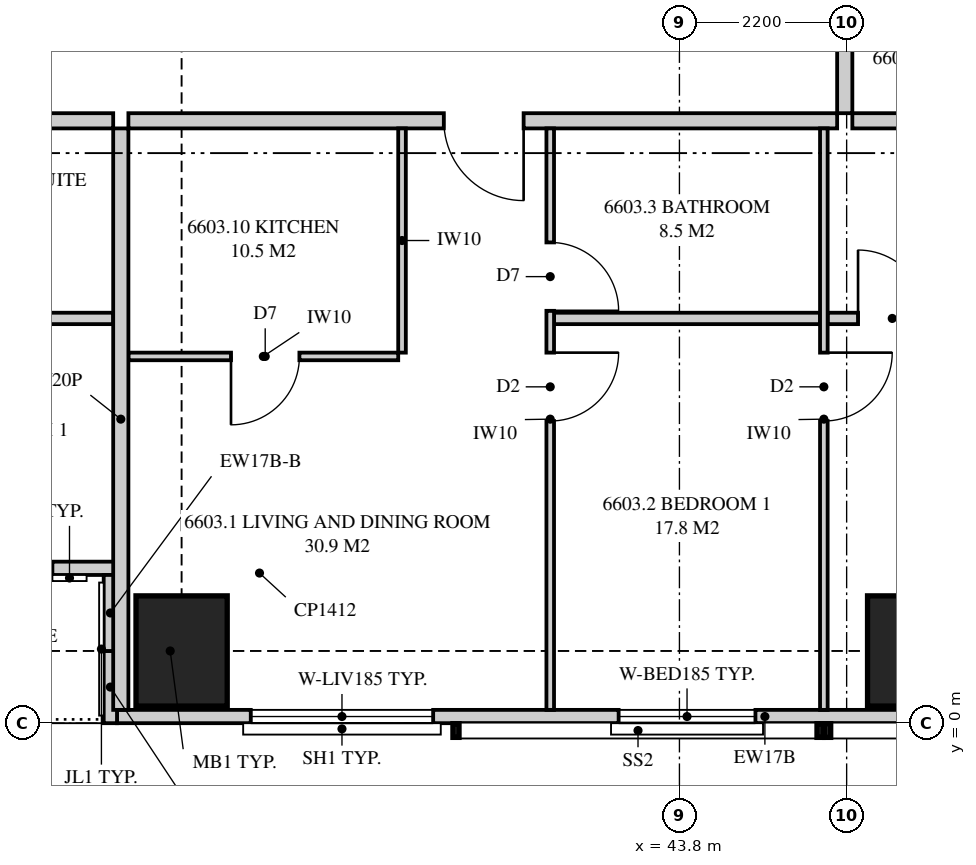
"""IFC4 building model, lengths in metres.
Left out: names, types, materials, properties, quantities, classifications, styles, units other than length and angle.
Written with IfcOpenShell. Run it as: python <this file> out.ifc"""

import sys

from ifc_helpers import new_model, si_unit, direction, frame, frame_2d, origin, origin_2d, place, context, subcontext, project, spatial, polyline, rectangle, outline, extrude, element, fill, save


model = new_model("IFC4")
c1 = context("Model", 3, precision=1e-05, world=origin(), true_north=direction((0.0, 1.0)))
c2 = subcontext(c1, "Body", "Model", "MODEL_VIEW")
j1 = project(units=[si_unit("LENGTHUNIT", "METRE"), si_unit("PLANEANGLEUNIT", "RADIAN")], contexts=[c1])
p1 = place(None, origin())
s1 = spatial("IfcSite", under=j1, at=p1, CompositionType="ELEMENT")
p2 = place(p1, origin())
s2 = spatial("IfcBuilding", under=s1, at=p2, CompositionType="ELEMENT")
p3 = place(p2, frame((0.0, 0.0, 242.45)))
s3 = spatial("IfcBuildingStorey", under=s2, at=p3, CompositionType="ELEMENT", Elevation=242.45)
for number, where, z_axis, x_axis in (
    (1, (37.25, 0.95, 0.0), (0.0, 0.0, 1.0), (0.0, 1.0, 0.0)),
    (2, (46.875, 0.95, 0.0), (0.0, 0.0, 1.0), (0.0, 1.0, 0.0)),
):
    element("IfcColumn", number, at=place(p3, frame(where, z_axis=z_axis, x_axis=x_axis)), inside=s3, PredefinedType="COLUMN", context=c2, shape_type="SweptSolid", body=[
        extrude(rectangle(XDim=1.45, YDim=1.2, at=origin_2d()), origin(), (0.0, 0.0, 1.0), 3.5),
    ])
p4 = place(p3, frame((36.4, 0.087, 0.0), z_axis=(0.0, 0.0, 1.0), x_axis=(1.0, 0.0, 0.0)))
e3 = element("IfcWall", 3, at=p4, inside=s3, PredefinedType="SOLIDWALL", context=c2, shape_type="SweptSolid", body=[
    extrude(outline(polyline([(0.0, 0.0), (17.049, 0.0), (17.049, 3.26), (10.69, 3.26), (10.69, 2.3), (10.606, 2.3), (10.606, 3.26), (10.475, 3.26), (10.475, 2.3), (0.0, 2.3), (0.0, 0.0)])), frame((0.0, 0.087, 0.0), z_axis=(0.0, -1.0, 0.0), x_axis=(1.0, 0.0, 0.0)), (0.0, 0.0, 1.0), 0.175),
])
p5 = place(p4, frame((1.76, 0.0, 0.4)))
e4 = element("IfcOpeningElement", 4, at=p5, cuts=e3, PredefinedType="OPENING", context=c2, shape_type="SweptSolid", body=[
    extrude(rectangle(XDim=2.4, YDim=1.85, at=frame_2d((1.2, 0.925))), frame((0.0, 0.097, 0.0), z_axis=(0.0, -1.0, 0.0), x_axis=(1.0, 0.0, 0.0)), (0.0, 0.0, 1.0), 0.195),
])
p6 = place(p4, frame((6.6, 0.0, 0.4)))
e5 = element("IfcOpeningElement", 5, at=p6, cuts=e3, PredefinedType="OPENING", context=c2, shape_type="SweptSolid", body=[
    extrude(rectangle(XDim=1.8, YDim=1.85, at=frame_2d((0.9, 0.925))), frame((0.0, 0.097, 0.0), z_axis=(0.0, -1.0, 0.0), x_axis=(1.0, 0.0, 0.0)), (0.0, 0.0, 1.0), 0.195),
])
p7 = place(p4, frame((11.357, 0.0, 0.4)))
e6 = element("IfcOpeningElement", 6, at=p7, cuts=e3, PredefinedType="OPENING", context=c2, shape_type="SweptSolid", body=[
    extrude(rectangle(XDim=1.8, YDim=1.85, at=frame_2d((0.9, 0.925))), frame((0.0, 0.097, 0.0), z_axis=(0.0, -1.0, 0.0), x_axis=(1.0, 0.0, 0.0)), (0.0, 0.0, 1.0), 0.195),
])
p8 = place(p4, frame((14.2, 0.0, 0.4)))
e7 = element("IfcOpeningElement", 7, at=p8, cuts=e3, PredefinedType="OPENING", context=c2, shape_type="SweptSolid", body=[
    extrude(rectangle(XDim=1.8, YDim=1.85, at=frame_2d((0.9, 0.925))), frame((0.0, 0.097, 0.0), z_axis=(0.0, -1.0, 0.0), x_axis=(1.0, 0.0, 0.0)), (0.0, 0.0, 1.0), 0.195),
])
p9 = place(p3, frame((32.9, 2.038, 0.0), z_axis=(0.0, 0.0, 1.0), x_axis=(1.0, 0.0, 0.0)))
e8 = element("IfcWall", 8, at=p9, inside=s3, PredefinedType="SOLIDWALL", context=c2, shape_type="SweptSolid", body=[
    extrude(outline(polyline([(0.0, 0.0), (3.5, 0.0), (3.5, 2.66), (3.15, 2.66), (3.15, 3.26), (0.0, 3.26), (0.0, 0.0)])), frame((0.0, 0.087, 0.0), z_axis=(0.0, -1.0, 0.0), x_axis=(1.0, 0.0, 0.0)), (0.0, 0.0, 1.0), 0.175),
])
p10 = place(p9, frame((0.85, 0.0, 0.0)))
e9 = element("IfcOpeningElement", 9, at=p10, cuts=e8, PredefinedType="OPENING", context=c2, shape_type="SweptSolid", body=[
    extrude(rectangle(XDim=1.8, YDim=2.25, at=frame_2d((0.9, 1.125))), frame((0.0, 0.097, 0.0), z_axis=(0.0, -1.0, 0.0), x_axis=(1.0, 0.0, 0.0)), (0.0, 0.0, 1.0), 0.195),
])
p11 = place(p3, frame((36.312, 0.0, 0.0), z_axis=(0.0, 0.0, 1.0), x_axis=(0.0, 1.0, 0.0)))
e10 = element("IfcWall", 10, at=p11, inside=s3, PredefinedType="SOLIDWALL", context=c2, shape_type="SweptSolid", body=[
    extrude(outline(polyline([(0.0, 0.0), (0.95, 0.0), (0.95, 2.3), (0.15, 2.3), (0.15, 3.26), (0.0, 3.26), (0.0, 0.0)])), frame((0.0, 0.087, 0.0), z_axis=(0.0, -1.0, 0.0), x_axis=(1.0, 0.0, 0.0)), (0.0, 0.0, 1.0), 0.175),
])
p12 = place(p3, frame((36.312, 0.95, 0.0), z_axis=(0.0, 0.0, 1.0), x_axis=(0.0, 1.0, 0.0)))
e11 = element("IfcWall", 11, at=p12, inside=s3, PredefinedType="SOLIDWALL", context=c2, shape_type="SweptSolid", body=[
    extrude(outline(polyline([(0.0, 0.0), (1.0, 0.0), (1.0, 2.66), (0.8, 2.66), (0.8, 2.3), (0.0, 2.3), (0.0, 0.0)])), frame((0.0, 0.087, 0.0), z_axis=(0.0, -1.0, 0.0), x_axis=(1.0, 0.0, 0.0)), (0.0, 0.0, 1.0), 0.175),
])
p13 = place(p3, frame((36.45, 0.175, 0.0), z_axis=(0.0, 0.0, 1.0), x_axis=(0.0, 1.0, 0.0)))
e12 = element("IfcWall", 12, at=p13, inside=s3, PredefinedType="PARTITIONING", context=c2, shape_type="SweptSolid", body=[
    extrude(outline(polyline([(0.0, 0.0), (7.65, 0.0), (7.65, 3.26), (7.65, 2.66), (1.685, 2.66), (1.685, 2.3), (0.0, 2.3), (0.0, 3.26), (0.0, 0.0)])), frame((0.0, 0.1, 0.0), z_axis=(0.0, -1.0, 0.0), x_axis=(1.0, 0.0, 0.0)), (0.0, 0.0, 1.0), 0.2),
])
p14 = place(p3, frame((26.7, 7.925, 0.0), z_axis=(0.0, 0.0, 1.0), x_axis=(1.0, 0.0, 0.0)))
e13 = element("IfcWall", 13, at=p14, inside=s3, PredefinedType="PARTITIONING", context=c2, shape_type="SweptSolid", body=[
    extrude(outline(polyline([(0.0, 0.0), (9.65, 0.0), (9.65, 3.26), (9.65, 2.66), (9.24, 2.66), (9.24, 3.26), (2.235, 3.26), (2.235, 2.66), (0.0, 2.66), (0.0, 3.26), (0.0, 0.0)])), frame((0.0, 0.1, 0.0), z_axis=(0.0, -1.0, 0.0), x_axis=(1.0, 0.0, 0.0)), (0.0, 0.0, 1.0), 0.2),
])
p15 = place(p14, frame((4.325, 0.0, 0.0)))
e14 = element("IfcOpeningElement", 14, at=p15, cuts=e13, PredefinedType="OPENING", context=c2, shape_type="SweptSolid", body=[
    extrude(rectangle(XDim=1.05, YDim=2.2, at=frame_2d((0.525, 1.1))), frame((0.0, 0.11, 0.0), z_axis=(0.0, -1.0, 0.0), x_axis=(1.0, 0.0, 0.0)), (0.0, 0.0, 1.0), 0.22),
])
p16 = place(p3, frame((32.9, 5.325, 0.0), z_axis=(0.0, 0.0, 1.0), x_axis=(1.0, 0.0, 0.0)))
e15 = element("IfcWall", 15, at=p16, inside=s3, PredefinedType="PLUMBINGWALL", context=c2, shape_type="SweptSolid", body=[
    extrude(outline(polyline([(0.0, 0.0), (3.45, 0.0), (3.45, 3.26), (3.45, 2.66), (3.065, 2.66), (3.065, 3.26), (0.0, 3.26), (0.0, 0.0)])), frame((0.0, 0.075, 0.0), z_axis=(0.0, -1.0, 0.0), x_axis=(1.0, 0.0, 0.0)), (0.0, 0.0, 1.0), 0.15),
])
p17 = place(p16, frame((0.4, 0.0, 0.0)))
e16 = element("IfcOpeningElement", 16, at=p17, cuts=e15, PredefinedType="OPENING", context=c2, shape_type="SweptSolid", body=[
    extrude(rectangle(XDim=0.9, YDim=2.1, at=frame_2d((0.45, 1.05))), frame((0.0, 0.085, 0.0), z_axis=(0.0, -1.0, 0.0), x_axis=(1.0, 0.0, 0.0)), (0.0, 0.0, 1.0), 0.17),
])
p18 = place(p3, frame((36.55, 7.925, 0.0), z_axis=(0.0, 0.0, 1.0), x_axis=(1.0, 0.0, 0.0)))
e17 = element("IfcWall", 17, at=p18, inside=s3, PredefinedType="PARTITIONING", context=c2, shape_type="SweptSolid", body=[
    extrude(outline(polyline([(0.0, 0.0), (9.325, 0.0), (9.325, 3.26), (9.325, 2.66), (9.015, 2.66), (9.015, 3.26), (2.01, 3.26), (2.01, 2.66), (0.0, 2.66), (0.0, 3.26), (0.0, 0.0)])), frame((0.0, 0.1, 0.0), z_axis=(0.0, -1.0, 0.0), x_axis=(1.0, 0.0, 0.0)), (0.0, 0.0, 1.0), 0.2),
])
p19 = place(p18, frame((4.15, 0.0, 0.0)))
e18 = element("IfcOpeningElement", 18, at=p19, cuts=e17, PredefinedType="OPENING", context=c2, shape_type="SweptSolid", body=[
    extrude(rectangle(XDim=1.05, YDim=2.2, at=frame_2d((0.525, 1.1))), frame((0.0, 0.11, 0.0), z_axis=(0.0, -1.0, 0.0), x_axis=(1.0, 0.0, 0.0)), (0.0, 0.0, 1.0), 0.22),
])
p20 = place(p3, frame((42.1, 0.175, 0.0), z_axis=(0.0, 0.0, 1.0), x_axis=(0.0, 1.0, 0.0)))
e19 = element("IfcWall", 19, at=p20, inside=s3, PredefinedType="PARTITIONING", context=c2, shape_type="SweptSolid", body=[
    extrude(outline(polyline([(0.0, 0.0), (7.65, 0.0), (7.65, 3.26), (1.635, 3.26), (1.635, 2.3), (0.0, 2.3), (0.0, 3.26), (0.0, 0.0)])), frame((0.0, 0.05, 0.0), z_axis=(0.0, -1.0, 0.0), x_axis=(1.0, 0.0, 0.0)), (0.0, 0.0, 1.0), 0.1),
])
p21 = place(p20, frame((3.8, 0.0, 0.0)))
e20 = element("IfcOpeningElement", 20, at=p21, cuts=e19, PredefinedType="OPENING", context=c2, shape_type="SweptSolid", body=[
    extrude(rectangle(XDim=0.9, YDim=2.1, at=frame_2d((0.45, 1.05))), frame((0.0, 0.06, 0.0), z_axis=(0.0, -1.0, 0.0), x_axis=(1.0, 0.0, 0.0)), (0.0, 0.0, 1.0), 0.12),
])
p22 = place(p20, frame((5.25, 0.0, 0.0)))
e21 = element("IfcOpeningElement", 21, at=p22, cuts=e19, PredefinedType="OPENING", context=c2, shape_type="SweptSolid", body=[
    extrude(rectangle(XDim=0.9, YDim=2.1, at=frame_2d((0.45, 1.05))), frame((0.0, 0.06, 0.0), z_axis=(0.0, -1.0, 0.0), x_axis=(1.0, 0.0, 0.0)), (0.0, 0.0, 1.0), 0.12),
])
p23 = place(p3, frame((45.7, 0.175, 0.0), z_axis=(0.0, 0.0, 1.0), x_axis=(0.0, 1.0, 0.0)))
e22 = element("IfcWall", 22, at=p23, inside=s3, PredefinedType="PARTITIONING", context=c2, shape_type="SweptSolid", body=[
    extrude(outline(polyline([(0.0, 0.0), (7.65, 0.0), (7.65, 3.26), (7.65, 2.66), (1.635, 2.66), (1.635, 2.3), (0.0, 2.3), (0.0, 3.26), (0.0, 0.0)])), frame((0.0, 0.05, 0.0), z_axis=(0.0, -1.0, 0.0), x_axis=(1.0, 0.0, 0.0)), (0.0, 0.0, 1.0), 0.1),
])
p24 = place(p23, frame((3.8, 0.0, 0.0)))
e23 = element("IfcOpeningElement", 23, at=p24, cuts=e22, PredefinedType="OPENING", context=c2, shape_type="SweptSolid", body=[
    extrude(rectangle(XDim=0.9, YDim=2.1, at=frame_2d((0.45, 1.05))), frame((0.0, 0.06, 0.0), z_axis=(0.0, -1.0, 0.0), x_axis=(1.0, 0.0, 0.0)), (0.0, 0.0, 1.0), 0.12),
])
p25 = place(p3, frame((42.15, 5.325, 0.0), z_axis=(0.0, 0.0, 1.0), x_axis=(1.0, 0.0, 0.0)))
e24 = element("IfcWall", 24, at=p25, inside=s3, PredefinedType="PLUMBINGWALL", context=c2, shape_type="SweptSolid", body=[
    extrude(outline(polyline([(0.0, 0.0), (3.5, 0.0), (3.5, 3.26), (3.5, 2.66), (3.44, 2.66), (3.44, 3.26), (0.0, 3.26), (0.0, 0.0)])), frame((0.0, 0.075, 0.0), z_axis=(0.0, -1.0, 0.0), x_axis=(1.0, 0.0, 0.0)), (0.0, 0.0, 1.0), 0.15),
])
p26 = place(p3, frame((45.75, 5.325, 0.0), z_axis=(0.0, 0.0, 1.0), x_axis=(1.0, 0.0, 0.0)))
e25 = element("IfcWall", 25, at=p26, inside=s3, PredefinedType="PLUMBINGWALL", context=c2, shape_type="SweptSolid", body=[
    extrude(outline(polyline([(0.0, 0.0), (4.2, 0.0), (4.2, 3.26), (2.41, 3.26), (2.41, 2.66), (0.0, 2.66), (0.0, 3.26), (0.0, 0.0)])), frame((0.0, 0.075, 0.0), z_axis=(0.0, -1.0, 0.0), x_axis=(1.0, 0.0, 0.0)), (0.0, 0.0, 1.0), 0.15),
])
p27 = place(p26, frame((0.4, 0.0, 0.0)))
e26 = element("IfcOpeningElement", 26, at=p27, cuts=e25, PredefinedType="OPENING", context=c2, shape_type="SweptSolid", body=[
    extrude(rectangle(XDim=0.9, YDim=2.1, at=frame_2d((0.45, 1.05))), frame((0.0, 0.085, 0.0), z_axis=(0.0, -1.0, 0.0), x_axis=(1.0, 0.0, 0.0)), (0.0, 0.0, 1.0), 0.17),
])
p28 = place(p3, frame((36.55, 4.825, 0.0), z_axis=(0.0, 0.0, 1.0), x_axis=(1.0, 0.0, 0.0)))
e27 = element("IfcWall", 27, at=p28, inside=s3, PredefinedType="PARTITIONING", context=c2, shape_type="SweptSolid", body=[
    extrude(outline(polyline([(0.0, 0.0), (3.55, 0.0), (3.55, 3.26), (1.96, 3.26), (1.96, 2.66), (0.0, 2.66), (0.0, 3.26), (0.0, 0.0)])), frame((0.0, 0.05, 0.0), z_axis=(0.0, -1.0, 0.0), x_axis=(1.0, 0.0, 0.0)), (0.0, 0.0, 1.0), 0.1),
])
p29 = place(p28, frame((1.35, 0.0, 0.0)))
e28 = element("IfcOpeningElement", 28, at=p29, cuts=e27, PredefinedType="OPENING", context=c2, shape_type="SweptSolid", body=[
    extrude(rectangle(XDim=0.9, YDim=2.1, at=frame_2d((0.45, 1.05))), frame((0.0, 0.06, 0.0), z_axis=(0.0, -1.0, 0.0), x_axis=(1.0, 0.0, 0.0)), (0.0, 0.0, 1.0), 0.12),
])
p30 = place(p3, frame((40.15, 4.875, 0.0), z_axis=(0.0, 0.0, 1.0), x_axis=(0.0, 1.0, 0.0)))
e29 = element("IfcWall", 29, at=p30, inside=s3, PredefinedType="PARTITIONING", context=c2, shape_type="SweptSolid", body=[
    extrude(rectangle(XDim=2.95, YDim=0.1, at=frame_2d((1.475, 0.0))), origin(), (0.0, 0.0, 1.0), 3.26),
])
p31 = place(p3, frame((46.075, 7.925, 0.0), z_axis=(0.0, 0.0, 1.0), x_axis=(1.0, 0.0, 0.0)))
e30 = element("IfcWall", 30, at=p31, inside=s3, PredefinedType="PARTITIONING", context=c2, shape_type="SweptSolid", body=[
    extrude(outline(polyline([(0.0, 0.0), (10.425, 0.0), (10.425, 3.26), (9.8, 3.26), (9.8, 2.3), (7.968, 2.3), (7.968, 3.26), (2.11, 3.26), (2.11, 2.66), (0.0, 2.66), (0.0, 3.26), (0.0, 0.0)])), frame((0.0, 0.1, 0.0), z_axis=(0.0, -1.0, 0.0), x_axis=(1.0, 0.0, 0.0)), (0.0, 0.0, 1.0), 0.2),
])
p32 = place(p3, frame((45.975, 8.025, 0.0), z_axis=(0.0, 0.0, 1.0), x_axis=(0.0, 1.0, 0.0)))
e31 = element("IfcWall", 31, at=p32, inside=s3, PredefinedType="PARTITIONING", context=c2, shape_type="SweptSolid", body=[
    extrude(outline(polyline([(0.0, 0.0), (6.025, 0.0), (6.025, 3.26), (6.025, 2.66), (5.085, 2.66), (0.0, 2.66), (0.0, 3.26), (0.0, 0.0)])), frame((0.0, 0.1, 0.0), z_axis=(0.0, -1.0, 0.0), x_axis=(1.0, 0.0, 0.0)), (0.0, 0.0, 1.0), 0.2),
])
p33 = place(p32, frame((2.512, 0.0, 0.0)))
e32 = element("IfcOpeningElement", 32, at=p33, cuts=e31, PredefinedType="OPENING", context=c2, shape_type="SweptSolid", body=[
    extrude(rectangle(XDim=1.05, YDim=2.2, at=frame_2d((0.525, 1.1))), frame((0.0, 0.11, 0.0), z_axis=(0.0, -1.0, 0.0), x_axis=(1.0, 0.0, 0.0)), (0.0, 0.0, 1.0), 0.22),
])
p34 = place(p5, origin())
e33 = element("IfcWindow", 33, at=p34, inside=s3, PartitioningType="SINGLE_PANEL", PredefinedType="WINDOW", context=c2, shape_type="SweptSolid", body=[
    extrude(rectangle(XDim=2.4, YDim=1.85, at=frame_2d((1.2, 0.925))), frame((0.0, 0.03, 0.0), z_axis=(0.0, -1.0, 0.0), x_axis=(1.0, 0.0, 0.0)), (0.0, 0.0, 1.0), 0.06),
])
fill(e4, e33)
p35 = place(p6, origin())
e34 = element("IfcWindow", 34, at=p35, inside=s3, PartitioningType="SINGLE_PANEL", PredefinedType="WINDOW", context=c2, shape_type="SweptSolid", body=[
    extrude(rectangle(XDim=1.8, YDim=1.85, at=frame_2d((0.9, 0.925))), frame((0.0, 0.03, 0.0), z_axis=(0.0, -1.0, 0.0), x_axis=(1.0, 0.0, 0.0)), (0.0, 0.0, 1.0), 0.06),
])
fill(e5, e34)
p36 = place(p19, frame((1.05, 0.0, 0.0), z_axis=(0.0, 0.0, 1.0), x_axis=(-1.0, 0.0, 0.0)))
e35 = element("IfcDoor", 35, at=p36, inside=s3, OperationType="SINGLE_SWING_LEFT", PredefinedType="DOOR", context=c2, shape_type="SweptSolid", body=[
    extrude(rectangle(XDim=1.05, YDim=2.2, at=frame_2d((0.525, 1.1))), frame((0.0, 0.025, 0.0), z_axis=(0.0, -1.0, 0.0), x_axis=(1.0, 0.0, 0.0)), (0.0, 0.0, 1.0), 0.05),
])
fill(e18, e35)
p37 = place(p21, frame((0.9, 0.0, 0.0), z_axis=(0.0, 0.0, 1.0), x_axis=(-1.0, 0.0, 0.0)))
e36 = element("IfcDoor", 36, at=p37, inside=s3, OperationType="SINGLE_SWING_LEFT", PredefinedType="DOOR", context=c2, shape_type="SweptSolid", body=[
    extrude(rectangle(XDim=0.9, YDim=2.1, at=frame_2d((0.45, 1.05))), frame((0.0, 0.025, 0.0), z_axis=(0.0, -1.0, 0.0), x_axis=(1.0, 0.0, 0.0)), (0.0, 0.0, 1.0), 0.05),
])
fill(e20, e36)
p38 = place(p22, frame((0.9, 0.0, 0.0), z_axis=(0.0, 0.0, 1.0), x_axis=(-1.0, 0.0, 0.0)))
e37 = element("IfcDoor", 37, at=p38, inside=s3, OperationType="SINGLE_SWING_RIGHT", PredefinedType="DOOR", context=c2, shape_type="SweptSolid", body=[
    extrude(rectangle(XDim=0.9, YDim=2.1, at=frame_2d((0.45, 1.05))), frame((0.0, 0.025, 0.0), z_axis=(0.0, -1.0, 0.0), x_axis=(1.0, 0.0, 0.0)), (0.0, 0.0, 1.0), 0.05),
])
fill(e21, e37)
p39 = place(p24, frame((0.9, 0.0, 0.0), z_axis=(0.0, 0.0, 1.0), x_axis=(-1.0, 0.0, 0.0)))
e38 = element("IfcDoor", 38, at=p39, inside=s3, OperationType="SINGLE_SWING_LEFT", PredefinedType="DOOR", context=c2, shape_type="SweptSolid", body=[
    extrude(rectangle(XDim=0.9, YDim=2.1, at=frame_2d((0.45, 1.05))), frame((0.0, 0.025, 0.0), z_axis=(0.0, -1.0, 0.0), x_axis=(1.0, 0.0, 0.0)), (0.0, 0.0, 1.0), 0.05),
])
fill(e23, e38)
p40 = place(p27, origin())
e39 = element("IfcDoor", 39, at=p40, inside=s3, OperationType="SINGLE_SWING_LEFT", PredefinedType="DOOR", context=c2, shape_type="SweptSolid", body=[
    extrude(rectangle(XDim=0.9, YDim=2.1, at=frame_2d((0.45, 1.05))), frame((0.0, 0.025, 0.0), z_axis=(0.0, -1.0, 0.0), x_axis=(1.0, 0.0, 0.0)), (0.0, 0.0, 1.0), 0.05),
])
fill(e26, e39)
p41 = place(p29, frame((0.9, 0.0, 0.0), z_axis=(0.0, 0.0, 1.0), x_axis=(-1.0, 0.0, 0.0)))
e40 = element("IfcDoor", 40, at=p41, inside=s3, OperationType="SINGLE_SWING_RIGHT", PredefinedType="DOOR", context=c2, shape_type="SweptSolid", body=[
    extrude(rectangle(XDim=0.9, YDim=2.1, at=frame_2d((0.45, 1.05))), frame((0.0, 0.025, 0.0), z_axis=(0.0, -1.0, 0.0), x_axis=(1.0, 0.0, 0.0)), (0.0, 0.0, 1.0), 0.05),
])
fill(e28, e40)
save(model, sys.argv[1])
